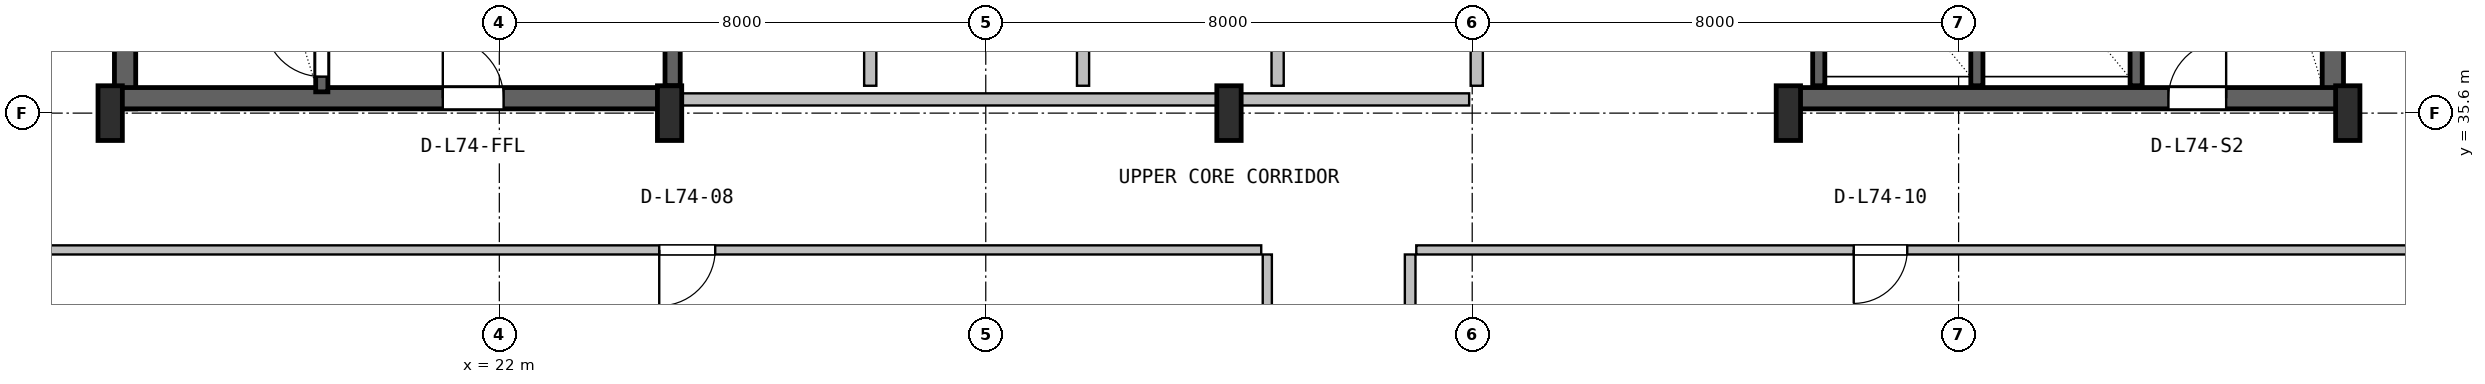
"""IFC4 building model, lengths in metres.
Left out: names, types, materials, properties, quantities, classifications, styles, units other than length and angle.
Written with IfcOpenShell. Run it as: python <this file> out.ifc"""

import sys

from ifc_helpers import new_model, si_unit, direction, frame, frame_2d, origin, origin_2d, place, context, subcontext, project, spatial, rectangle, i_section, extrude, source, transform, mapped, element, fill, save


model = new_model("IFC4")
c1 = context("Model", 3, precision=1e-05, world=origin(), true_north=direction((0.0, 1.0)))
c2 = subcontext(c1, "Body", "Model", "MODEL_VIEW")
j1 = project(units=[si_unit("LENGTHUNIT", "METRE"), si_unit("PLANEANGLEUNIT", "RADIAN")], contexts=[c1])
p1 = place(None, origin())
s1 = spatial("IfcSite", under=j1, at=p1, CompositionType="ELEMENT")
p2 = place(p1, origin())
s2 = spatial("IfcBuilding", under=s1, at=p2, CompositionType="ELEMENT")
p3 = place(p2, frame((0.0, 0.0, 296.4)))
s3 = spatial("IfcBuildingStorey", under=s2, at=p3, CompositionType="ELEMENT", Elevation=296.4)
for number, where, z_axis, x_axis in (
    (1, (15.845, 35.67, 0.0), (0.0, 0.0, 1.0), (0.0, 1.0, 0.0)),
    (2, (52.155, 35.67, 0.0), (0.0, 0.0, 1.0), (0.0, 1.0, 0.0)),
):
    element("IfcWall", number, at=place(p3, frame(where, z_axis=z_axis, x_axis=x_axis)), inside=s3, PredefinedType="SHEAR", context=c2, shape_type="SweptSolid", body=[
        extrude(rectangle(XDim=11.13, YDim=0.35, at=frame_2d((5.565, 0.0))), origin(), (0.0, 0.0, 1.0), 3.52),
    ])
p4 = place(p3, frame((15.67, 35.845, 0.0), z_axis=(0.0, 0.0, 1.0), x_axis=(1.0, 0.0, 0.0)))
e3 = element("IfcWall", 3, at=p4, inside=s3, PredefinedType="SHEAR", context=c2, shape_type="SweptSolid", body=[
    extrude(rectangle(XDim=9.13, YDim=0.35, at=frame_2d((4.565, 0.0))), origin(), (0.0, 0.0, 1.0), 3.52),
])
p5 = place(p4, frame((5.4, 0.0, 0.0)))
e4 = element("IfcOpeningElement", 4, at=p5, cuts=e3, PredefinedType="OPENING", context=c2, shape_type="SweptSolid", body=[
    extrude(rectangle(XDim=1.0, YDim=2.1, at=frame_2d((0.5, 1.05))), frame((0.0, 0.185, 0.0), z_axis=(0.0, -1.0, 0.0), x_axis=(1.0, 0.0, 0.0)), (0.0, 0.0, 1.0), 0.37),
])
p6 = place(p3, frame((43.2, 35.845, 0.0), z_axis=(0.0, 0.0, 1.0), x_axis=(1.0, 0.0, 0.0)))
e5 = element("IfcWall", 5, at=p6, inside=s3, PredefinedType="SHEAR", context=c2, shape_type="SweptSolid", body=[
    extrude(rectangle(XDim=9.13, YDim=0.35, at=frame_2d((4.565, 0.0))), origin(), (0.0, 0.0, 1.0), 3.52),
])
p7 = place(p6, frame((6.25, 0.0, 0.0)))
e6 = element("IfcOpeningElement", 6, at=p7, cuts=e5, PredefinedType="OPENING", context=c2, shape_type="SweptSolid", body=[
    extrude(rectangle(XDim=0.95, YDim=2.1, at=frame_2d((0.475, 1.05))), frame((0.0, 0.185, 0.0), z_axis=(0.0, -1.0, 0.0), x_axis=(1.0, 0.0, 0.0)), (0.0, 0.0, 1.0), 0.37),
])
m1 = source(origin(), c2, "Body", "SweptSolid", [
    extrude(i_section(OverallWidth=0.4, OverallDepth=0.9, WebThickness=0.016, FlangeThickness=0.028, FilletRadius=0.016, at=origin_2d()), origin(), (0.0, 0.0, 1.0), 3.8),
])
for number, where, z_axis, x_axis in (
    (7, (15.6, 35.6, 0.0), (0.0, 0.0, 1.0), (1.0, 0.0, 0.0)),
    (8, (24.8, 35.6, 0.0), (0.0, 0.0, 1.0), (1.0, 0.0, 0.0)),
    (9, (34.0, 35.6, 0.0), (0.0, 0.0, 1.0), (1.0, 0.0, 0.0)),
    (10, (43.2, 35.6, 0.0), (0.0, 0.0, 1.0), (1.0, 0.0, 0.0)),
    (11, (52.4, 35.6, 0.0), (0.0, 0.0, 1.0), (1.0, 0.0, 0.0)),
):
    element("IfcColumn", number, at=place(p3, frame(where, z_axis=z_axis, x_axis=x_axis)), inside=s3, PredefinedType="COLUMN", context=c2, shape_type="MappedRepresentation", body=[
        mapped(m1, transform((0.0, 0.0, 0.0), x_axis=(1.0, 0.0, 0.0), y_axis=(0.0, 1.0, 0.0), z_axis=(0.0, 0.0, 1.0), scale=1.0)),
    ])
p8 = place(p3, frame((19.08, 35.95, 0.0), z_axis=(0.0, 0.0, 1.0), x_axis=(0.0, 1.0, 0.0)))
e12 = element("IfcWall", 12, at=p8, inside=s3, PredefinedType="SHEAR", context=c2, shape_type="SweptSolid", body=[
    extrude(rectangle(XDim=9.65, YDim=0.2, at=frame_2d((4.825, 0.0))), origin(), (0.0, 0.0, 1.0), 3.52),
])
p9 = place(p8, frame((0.25, 0.0, 0.0)))
e13 = element("IfcOpeningElement", 13, at=p9, cuts=e12, PredefinedType="OPENING", context=c2, shape_type="SweptSolid", body=[
    extrude(rectangle(XDim=0.95, YDim=2.1, at=frame_2d((0.475, 1.05))), frame((0.0, 0.11, 0.0), z_axis=(0.0, -1.0, 0.0), x_axis=(1.0, 0.0, 0.0)), (0.0, 0.0, 1.0), 0.22),
])
p10 = place(p3, frame((24.85, 36.05, 0.0), z_axis=(0.0, 0.0, 1.0), x_axis=(0.0, 1.0, 0.0)))
e14 = element("IfcWall", 14, at=p10, inside=s3, PredefinedType="SHEAR", context=c2, shape_type="SweptSolid", body=[
    extrude(rectangle(XDim=10.45, YDim=0.25, at=frame_2d((5.225, 0.0))), origin(), (0.0, 0.0, 1.0), 3.52),
])
p11 = place(p3, frame((48.92, 36.05, 0.0), z_axis=(0.0, 0.0, 1.0), x_axis=(0.0, 1.0, 0.0)))
e15 = element("IfcWall", 15, at=p11, inside=s3, PredefinedType="SHEAR", context=c2, shape_type="SweptSolid", body=[
    extrude(rectangle(XDim=10.5, YDim=0.2, at=frame_2d((5.25, 0.0))), origin(), (0.0, 0.0, 1.0), 3.52),
])
for number, where, z_axis, x_axis in (
    (16, (43.7, 36.05, 0.0), (0.0, 0.0, 1.0), (0.0, 1.0, 0.0)),
    (17, (46.3, 36.05, 0.0), (0.0, 0.0, 1.0), (0.0, 1.0, 0.0)),
):
    element("IfcWall", number, at=place(p3, frame(where, z_axis=z_axis, x_axis=x_axis)), inside=s3, PredefinedType="SHEAR", context=c2, shape_type="SweptSolid", body=[
        extrude(rectangle(XDim=3.05, YDim=0.2, at=frame_2d((1.525, 0.0))), origin(), (0.0, 0.0, 1.0), 3.52),
    ])
p12 = place(p3, frame((25.0, 35.825, 0.0), z_axis=(0.0, 0.0, 1.0), x_axis=(1.0, 0.0, 0.0)))
e18 = element("IfcWall", 18, at=p12, inside=s3, PredefinedType="SOLIDWALL", context=c2, shape_type="SweptSolid", body=[
    extrude(rectangle(XDim=12.95, YDim=0.2, at=frame_2d((6.475, 0.0))), origin(), (0.0, 0.0, 1.0), 2.545),
])
for number, where, z_axis, x_axis in (
    (19, (28.1, 36.05, 0.0), (0.0, 0.0, 1.0), (0.0, 1.0, 0.0)),
    (20, (31.6, 36.05, 0.0), (0.0, 0.0, 1.0), (0.0, 1.0, 0.0)),
):
    element("IfcWall", number, at=place(p3, frame(where, z_axis=z_axis, x_axis=x_axis)), inside=s3, PredefinedType="PLUMBINGWALL", context=c2, shape_type="SweptSolid", body=[
        extrude(rectangle(XDim=3.1, YDim=0.2, at=frame_2d((1.55, 0.0))), origin(), (0.0, 0.0, 1.0), 3.5),
    ])
for number, where, z_axis, x_axis in (
    (21, (34.8, 36.05, 0.0), (0.0, 0.0, 1.0), (0.0, 1.0, 0.0)),
    (22, (38.075, 36.05, 0.0), (0.0, 0.0, 1.0), (0.0, 1.0, 0.0)),
):
    element("IfcWall", number, at=place(p3, frame(where, z_axis=z_axis, x_axis=x_axis)), inside=s3, PredefinedType="SOLIDWALL", context=c2, shape_type="SweptSolid", body=[
        extrude(rectangle(XDim=3.1, YDim=0.2, at=frame_2d((1.55, 0.0))), origin(), (0.0, 0.0, 1.0), 3.5),
    ])
p13 = place(p3, frame((34.63, 23.185, 0.0), z_axis=(0.0, 0.0, 1.0), x_axis=(0.0, 1.0, 0.0)))
e23 = element("IfcWall", 23, at=p13, inside=s3, PredefinedType="PARTITIONING", context=c2, shape_type="SweptSolid", body=[
    extrude(rectangle(XDim=10.09, YDim=0.15, at=frame_2d((5.045, 0.0))), origin(), (0.0, 0.0, 1.0), 1.895),
])
p14 = place(p3, frame((12.18, 33.35, 0.0), z_axis=(0.0, 0.0, 1.0), x_axis=(1.0, 0.0, 0.0)))
e24 = element("IfcWall", 24, at=p14, inside=s3, PredefinedType="PARTITIONING", context=c2, shape_type="SweptSolid", body=[
    extrude(rectangle(XDim=22.35, YDim=0.15, at=frame_2d((11.175, 0.0))), origin(), (0.0, 0.0, 1.0), 2.165),
])
p15 = place(p14, frame((12.45, 0.0, 0.0)))
e25 = element("IfcOpeningElement", 25, at=p15, cuts=e24, PredefinedType="OPENING", context=c2, shape_type="SweptSolid", body=[
    extrude(rectangle(XDim=0.92, YDim=2.08, at=frame_2d((0.46, 1.04))), frame((0.0, 0.085, 0.0), z_axis=(0.0, -1.0, 0.0), x_axis=(1.0, 0.0, 0.0)), (0.0, 0.0, 1.0), 0.17),
])
p16 = place(p3, frame((36.98, 20.96, 0.0), z_axis=(0.0, 0.0, 1.0), x_axis=(0.0, 1.0, 0.0)))
e26 = element("IfcWall", 26, at=p16, inside=s3, PredefinedType="PARTITIONING", context=c2, shape_type="SweptSolid", body=[
    extrude(rectangle(XDim=12.315, YDim=0.175, at=frame_2d((6.157, 0.0))), origin(), (0.0, 0.0, 1.0), 1.895),
])
p17 = place(p3, frame((37.08, 33.35, 0.0), z_axis=(0.0, 0.0, 1.0), x_axis=(1.0, 0.0, 0.0)))
e27 = element("IfcWall", 27, at=p17, inside=s3, PredefinedType="PARTITIONING", context=c2, shape_type="SweptSolid", body=[
    extrude(rectangle(XDim=18.74, YDim=0.15, at=frame_2d((9.37, 0.0))), origin(), (0.0, 0.0, 1.0), 2.951),
])
p18 = place(p17, frame((7.195, 0.0, 0.0)))
e28 = element("IfcOpeningElement", 28, at=p18, cuts=e27, PredefinedType="OPENING", context=c2, shape_type="SweptSolid", body=[
    extrude(rectangle(XDim=0.88, YDim=2.06, at=frame_2d((0.44, 1.03))), frame((0.0, 0.085, 0.0), z_axis=(0.0, -1.0, 0.0), x_axis=(1.0, 0.0, 0.0)), (0.0, 0.0, 1.0), 0.17),
])
m2 = source(origin(), c2, "Body", "SweptSolid", [
    extrude(rectangle(XDim=0.95, YDim=2.1, at=frame_2d((0.475, 1.05))), frame((0.0, 0.025, 0.0), z_axis=(0.0, -1.0, 0.0), x_axis=(1.0, 0.0, 0.0)), (0.0, 0.0, 1.0), 0.05),
])
p19 = place(p9, origin())
e29 = element("IfcDoor", 29, at=p19, inside=s3, OperationType="SINGLE_SWING_RIGHT", PredefinedType="DOOR", context=c2, shape_type="MappedRepresentation", body=[
    mapped(m2, transform((0.0, 0.0, 0.0), x_axis=(1.0, 0.0, 0.0), y_axis=(0.0, 1.0, 0.0), z_axis=(0.0, 0.0, 1.0), scale=1.0)),
])
fill(e13, e29)
m3 = source(origin(), c2, "Body", "SweptSolid", [
    extrude(rectangle(XDim=1.0, YDim=2.1, at=frame_2d((0.5, 1.05))), frame((0.0, 0.025, 0.0), z_axis=(0.0, -1.0, 0.0), x_axis=(1.0, 0.0, 0.0)), (0.0, 0.0, 1.0), 0.05),
])
p20 = place(p5, origin())
e30 = element("IfcDoor", 30, at=p20, inside=s3, OperationType="SINGLE_SWING_LEFT", PredefinedType="DOOR", context=c2, shape_type="MappedRepresentation", body=[
    mapped(m3, transform((0.0, 0.0, 0.0), x_axis=(1.0, 0.0, 0.0), y_axis=(0.0, 1.0, 0.0), z_axis=(0.0, 0.0, 1.0), scale=1.0)),
])
fill(e4, e30)
p21 = place(p7, origin())
e31 = element("IfcDoor", 31, at=p21, inside=s3, OperationType="SINGLE_SWING_RIGHT", PredefinedType="DOOR", context=c2, shape_type="MappedRepresentation", body=[
    mapped(m2, transform((0.0, 0.0, 0.0), x_axis=(1.0, 0.0, 0.0), y_axis=(0.0, 1.0, 0.0), z_axis=(0.0, 0.0, 1.0), scale=1.0)),
])
fill(e6, e31)
m4 = source(origin(), c2, "Body", "SweptSolid", [
    extrude(rectangle(XDim=0.92, YDim=2.08, at=frame_2d((0.46, 1.04))), frame((0.0, 0.025, 0.0), z_axis=(0.0, -1.0, 0.0), x_axis=(1.0, 0.0, 0.0)), (0.0, 0.0, 1.0), 0.05),
])
p22 = place(p15, frame((0.92, 0.0, 0.0), z_axis=(0.0, 0.0, 1.0), x_axis=(-1.0, 0.0, 0.0)))
e32 = element("IfcDoor", 32, at=p22, inside=s3, OperationType="SINGLE_SWING_LEFT", PredefinedType="DOOR", context=c2, shape_type="MappedRepresentation", body=[
    mapped(m4, transform((0.0, 0.0, 0.0), x_axis=(1.0, 0.0, 0.0), y_axis=(0.0, 1.0, 0.0), z_axis=(0.0, 0.0, 1.0), scale=1.0)),
])
fill(e25, e32)
m5 = source(origin(), c2, "Body", "SweptSolid", [
    extrude(rectangle(XDim=0.88, YDim=2.06, at=frame_2d((0.44, 1.03))), frame((0.0, 0.025, 0.0), z_axis=(0.0, -1.0, 0.0), x_axis=(1.0, 0.0, 0.0)), (0.0, 0.0, 1.0), 0.05),
])
p23 = place(p18, frame((0.88, 0.0, 0.0), z_axis=(0.0, 0.0, 1.0), x_axis=(-1.0, 0.0, 0.0)))
e33 = element("IfcDoor", 33, at=p23, inside=s3, OperationType="SINGLE_SWING_LEFT", PredefinedType="DOOR", context=c2, shape_type="MappedRepresentation", body=[
    mapped(m5, transform((0.0, 0.0, 0.0), x_axis=(1.0, 0.0, 0.0), y_axis=(0.0, 1.0, 0.0), z_axis=(0.0, 0.0, 1.0), scale=1.0)),
])
fill(e28, e33)
save(model, sys.argv[1])
